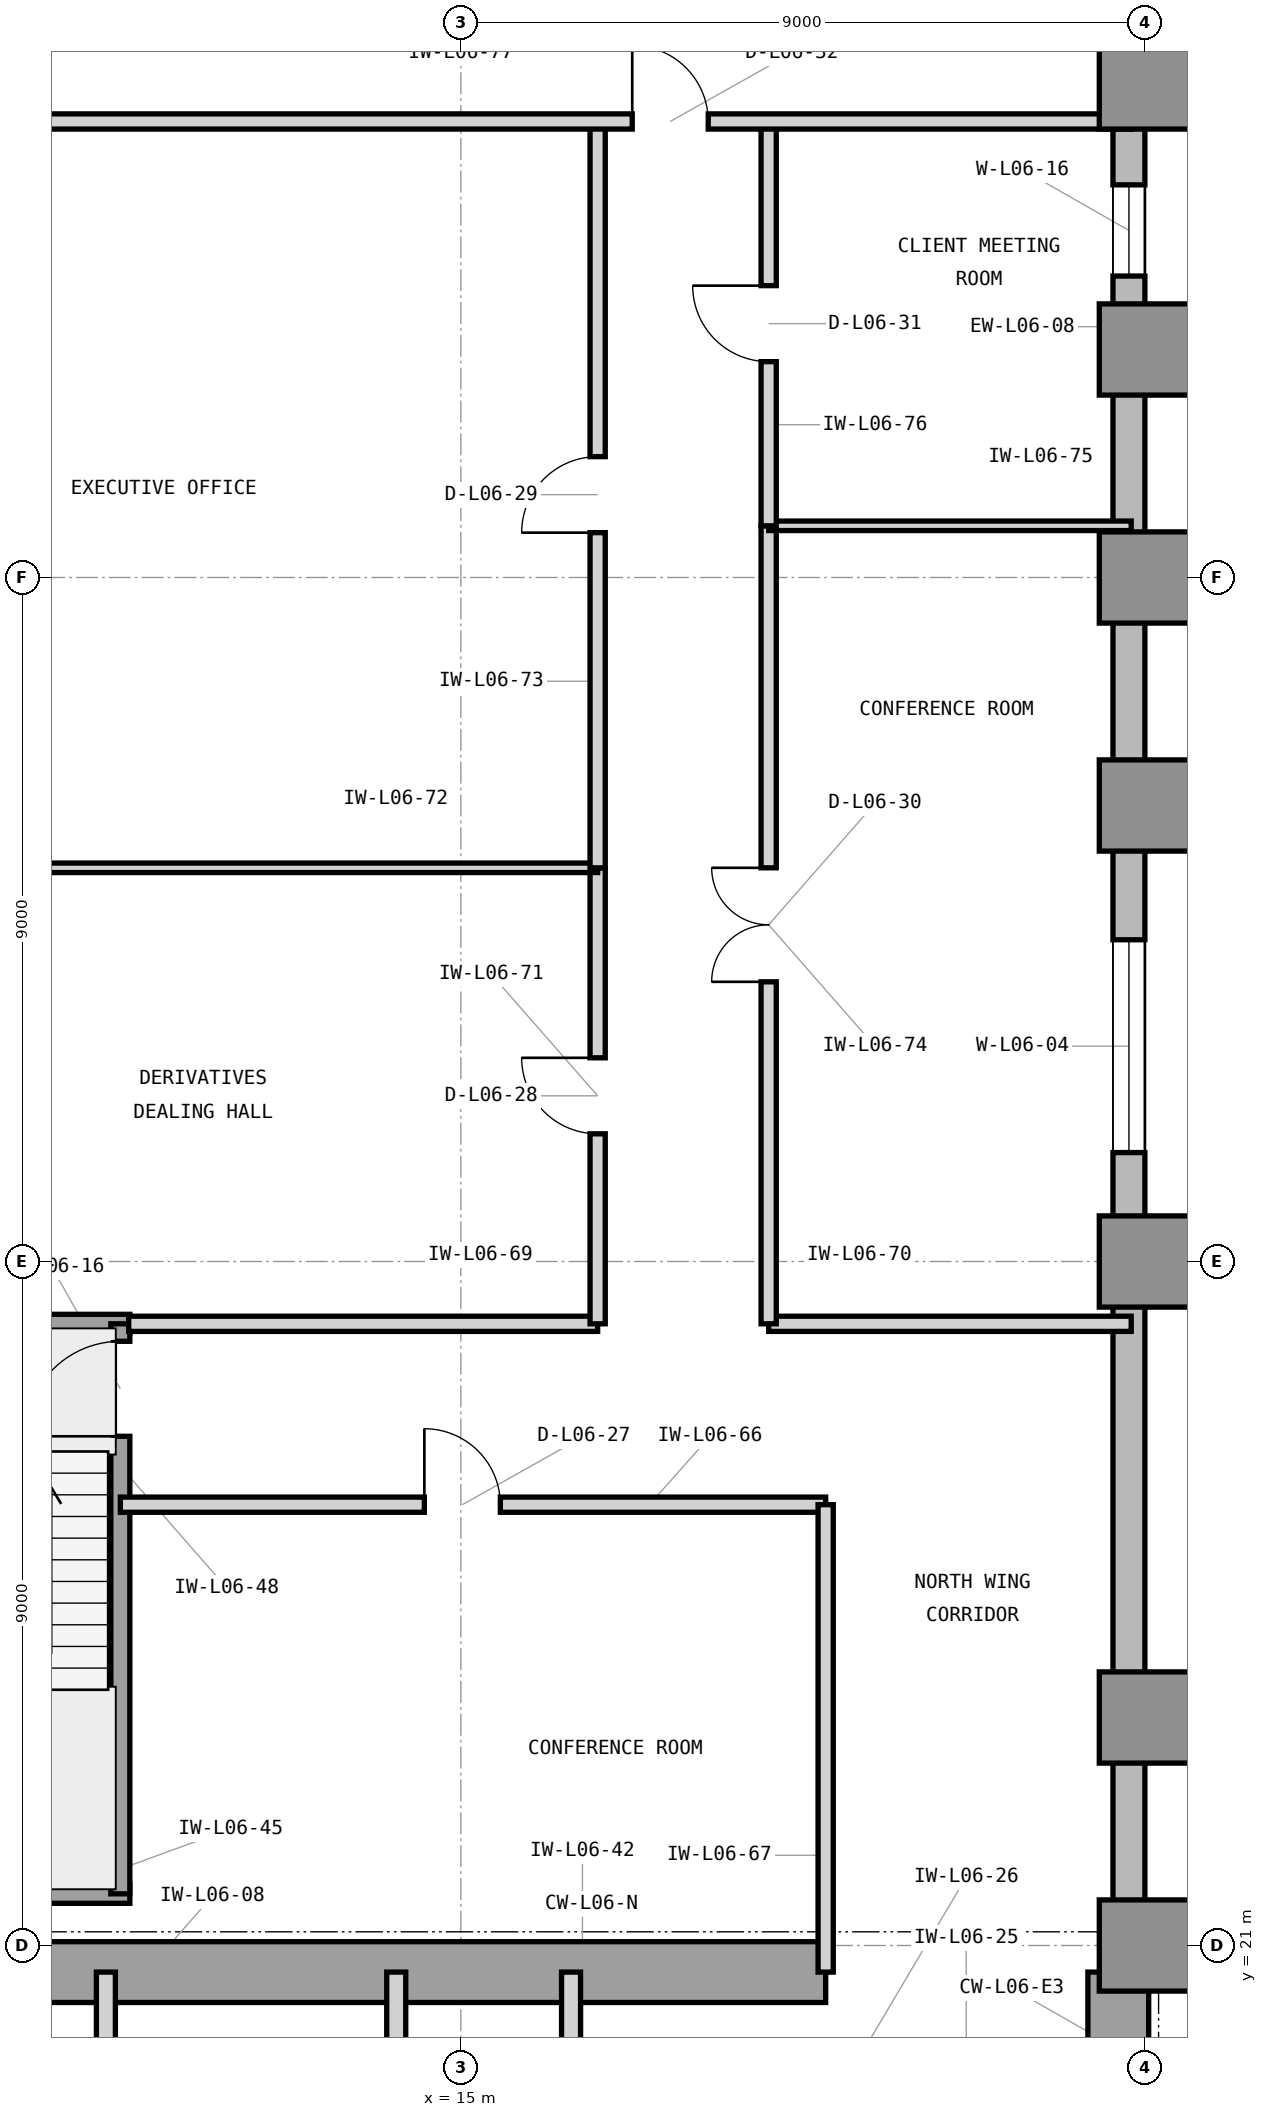
"""IFC4 building model, lengths in metres.
Left out: names, types, materials, properties, quantities, classifications, styles, units other than length and angle.
Written with IfcOpenShell. Run it as: python <this file> out.ifc"""

import sys

from ifc_helpers import new_model, si_unit, direction, frame, frame_2d, origin, origin_2d, place, context, subcontext, project, spatial, rectangle, extrude, element, fill, save


model = new_model("IFC4")
c1 = context("Model", 3, precision=1e-05, world=origin(), true_north=direction((0.0, 1.0)))
c2 = subcontext(c1, "Body", "Model", "MODEL_VIEW")
j1 = project(units=[si_unit("LENGTHUNIT", "METRE"), si_unit("PLANEANGLEUNIT", "RADIAN")], contexts=[c1])
p1 = place(None, origin())
s1 = spatial("IfcSite", under=j1, at=p1, CompositionType="ELEMENT")
p2 = place(p1, origin())
s2 = spatial("IfcBuilding", under=s1, at=p2, CompositionType="ELEMENT")
p3 = place(p2, frame((0.0, 0.0, 30.0)))
s3 = spatial("IfcBuildingStorey", under=s2, at=p3, CompositionType="ELEMENT", Elevation=30.0)
p4 = place(p3, frame((7.475, 20.65, 0.0), z_axis=(0.0, 0.0, 1.0), x_axis=(1.0, 0.0, 0.0)))
e1 = element("IfcWall", 1, at=p4, inside=s3, PredefinedType="SHEAR", context=c2, shape_type="SweptSolid", body=[
    extrude(rectangle(XDim=12.325, YDim=0.8, at=frame_2d((6.163, 0.0))), origin(), (0.0, 0.0, 1.0), 4.2),
])
p5 = place(p3, frame((23.65, 16.6, 0.0), z_axis=(0.0, 0.0, 1.0), x_axis=(0.0, 1.0, 0.0)))
e2 = element("IfcWall", 2, at=p5, inside=s3, PredefinedType="SHEAR", context=c2, shape_type="SweptSolid", body=[
    extrude(rectangle(XDim=4.05, YDim=0.8, at=frame_2d((2.025, 0.0))), origin(), (0.0, 0.0, 1.0), 4.2),
])
for number, where, z_axis, x_axis in (
    (3, (24.0, 21.0, 0.0), (0.0, 0.0, 1.0), (1.0, 0.0, 0.0)),
    (4, (24.0, 24.0, 0.0), (0.0, 0.0, 1.0), (1.0, 0.0, 0.0)),
    (5, (24.0, 30.0, 0.0), (0.0, 0.0, 1.0), (1.0, 0.0, 0.0)),
    (6, (24.0, 36.0, 0.0), (0.0, 0.0, 1.0), (1.0, 0.0, 0.0)),
    (7, (24.0, 39.0, 0.0), (0.0, 0.0, 1.0), (1.0, 0.0, 0.0)),
    (8, (24.0, 42.0, 0.0), (0.0, 0.0, 1.0), (1.0, 0.0, 0.0)),
    (9, (24.0, 45.5, 0.0), (0.0, 0.0, 1.0), (1.0, 0.0, 0.0)),
):
    element("IfcColumn", number, at=place(p3, frame(where, z_axis=z_axis, x_axis=x_axis)), inside=s3, PredefinedType="COLUMN", context=c2, shape_type="SweptSolid", body=[
        extrude(rectangle(XDim=1.2, YDim=1.2, at=origin_2d()), origin(), (0.0, 0.0, 1.0), 4.2),
    ])
p6 = place(p3, frame((64.4, 20.79, 0.0), z_axis=(0.0, 0.0, 1.0), x_axis=(-1.0, 0.0, 0.0)))
e10 = element("IfcWall", 10, at=p6, inside=s3, PredefinedType="STANDARD", context=c2, shape_type="SweptSolid", body=[
    extrude(rectangle(XDim=40.4, YDim=0.42, at=frame_2d((20.2, 0.0))), origin(), (0.0, 0.0, 1.0), 3.98),
])
p7 = place(p6, frame((26.375, 0.0, 0.85)))
e11 = element("IfcOpeningElement", 11, at=p7, cuts=e10, PredefinedType="OPENING", context=c2, shape_type="SweptSolid", body=[
    extrude(rectangle(XDim=2.8, YDim=2.45, at=frame_2d((1.4, 1.225))), frame((0.0, 0.22, 0.0), z_axis=(0.0, -1.0, 0.0), x_axis=(1.0, 0.0, 0.0)), (0.0, 0.0, 1.0), 0.44),
])
p8 = place(p6, frame((38.222, 0.0, 0.85)))
e12 = element("IfcOpeningElement", 12, at=p8, cuts=e10, PredefinedType="OPENING", context=c2, shape_type="SweptSolid", body=[
    extrude(rectangle(XDim=1.2, YDim=2.45, at=frame_2d((0.6, 1.225))), frame((0.0, 0.22, 0.0), z_axis=(0.0, -1.0, 0.0), x_axis=(1.0, 0.0, 0.0)), (0.0, 0.0, 1.0), 0.44),
])
p9 = place(p6, frame((32.536, 0.0, 0.85)))
e13 = element("IfcOpeningElement", 13, at=p9, cuts=e10, PredefinedType="OPENING", context=c2, shape_type="SweptSolid", body=[
    extrude(rectangle(XDim=2.8, YDim=2.45, at=frame_2d((1.4, 1.225))), frame((0.0, 0.22, 0.0), z_axis=(0.0, -1.0, 0.0), x_axis=(1.0, 0.0, 0.0)), (0.0, 0.0, 1.0), 0.44),
])
p10 = place(p6, frame((17.386, 0.0, 0.85)))
e14 = element("IfcOpeningElement", 14, at=p10, cuts=e10, PredefinedType="OPENING", context=c2, shape_type="SweptSolid", body=[
    extrude(rectangle(XDim=2.8, YDim=2.45, at=frame_2d((1.4, 1.225))), frame((0.0, 0.22, 0.0), z_axis=(0.0, -1.0, 0.0), x_axis=(1.0, 0.0, 0.0)), (0.0, 0.0, 1.0), 0.44),
])
p11 = place(p6, frame((8.436, 0.0, 0.85)))
e15 = element("IfcOpeningElement", 15, at=p11, cuts=e10, PredefinedType="OPENING", context=c2, shape_type="SweptSolid", body=[
    extrude(rectangle(XDim=1.2, YDim=2.45, at=frame_2d((0.6, 1.225))), frame((0.0, 0.22, 0.0), z_axis=(0.0, -1.0, 0.0), x_axis=(1.0, 0.0, 0.0)), (0.0, 0.0, 1.0), 0.44),
])
p12 = place(p3, frame((23.79, 21.0, 0.0), z_axis=(0.0, 0.0, 1.0), x_axis=(0.0, 1.0, 0.0)))
e16 = element("IfcWall", 16, at=p12, inside=s3, PredefinedType="STANDARD", context=c2, shape_type="SweptSolid", body=[
    extrude(rectangle(XDim=28.4, YDim=0.42, at=frame_2d((14.2, 0.0))), origin(), (0.0, 0.0, 1.0), 3.98),
])
p13 = place(p12, frame((10.433, 0.0, 0.85)))
e17 = element("IfcOpeningElement", 17, at=p13, cuts=e16, PredefinedType="OPENING", context=c2, shape_type="SweptSolid", body=[
    extrude(rectangle(XDim=2.8, YDim=2.45, at=frame_2d((1.4, 1.225))), frame((0.0, 0.22, 0.0), z_axis=(0.0, -1.0, 0.0), x_axis=(1.0, 0.0, 0.0)), (0.0, 0.0, 1.0), 0.44),
])
p14 = place(p12, frame((21.966, 0.0, 0.85)))
e18 = element("IfcOpeningElement", 18, at=p14, cuts=e16, PredefinedType="OPENING", context=c2, shape_type="SweptSolid", body=[
    extrude(rectangle(XDim=1.2, YDim=2.45, at=frame_2d((0.6, 1.225))), frame((0.0, 0.22, 0.0), z_axis=(0.0, -1.0, 0.0), x_axis=(1.0, 0.0, 0.0)), (0.0, 0.0, 1.0), 0.44),
])
p15 = place(p3, frame((10.33, 19.45, 0.0), z_axis=(0.0, 0.0, 1.0), x_axis=(0.0, 1.0, 0.0)))
e19 = element("IfcWall", 19, at=p15, inside=s3, PredefinedType="PARTITIONING", context=c2, shape_type="SweptSolid", body=[
    extrude(rectangle(XDim=1.2, YDim=0.25, at=frame_2d((0.6, 0.0))), origin(), (0.0, 0.0, 1.0), 3.114),
])
for number, where, z_axis, x_axis in (
    (20, (14.15, 16.7, 0.0), (0.0, 0.0, 1.0), (0.0, 1.0, 0.0)),
    (21, (16.45, 16.7, 0.0), (0.0, 0.0, 1.0), (0.0, 1.0, 0.0)),
):
    element("IfcWall", number, at=place(p3, frame(where, z_axis=z_axis, x_axis=x_axis)), inside=s3, PredefinedType="PARTITIONING", context=c2, shape_type="SweptSolid", body=[
        extrude(rectangle(XDim=3.95, YDim=0.25, at=frame_2d((1.975, 0.0))), origin(), (0.0, 0.0, 1.0), 3.97),
    ])
for number, where, z_axis, x_axis in (
    (22, (6.555, 21.68, 0.0), (0.0, 0.0, 1.0), (1.0, 0.0, 0.0)),
    (23, (6.555, 29.18, 0.0), (0.0, 0.0, 1.0), (1.0, 0.0, 0.0)),
):
    element("IfcWall", number, at=place(p3, frame(where, z_axis=z_axis, x_axis=x_axis)), inside=s3, PredefinedType="SHEAR", context=c2, shape_type="SweptSolid", body=[
        extrude(rectangle(XDim=4.09, YDim=0.25, at=frame_2d((2.045, 0.0))), origin(), (0.0, 0.0, 1.0), 4.2),
    ])
p16 = place(p3, frame((10.52, 21.68, 0.0), z_axis=(0.0, 0.0, 1.0), x_axis=(0.0, 1.0, 0.0)))
e24 = element("IfcWall", 24, at=p16, inside=s3, PredefinedType="SHEAR", context=c2, shape_type="SweptSolid", body=[
    extrude(rectangle(XDim=7.5, YDim=0.25, at=frame_2d((3.75, 0.0))), origin(), (0.0, 0.0, 1.0), 4.2),
])
p17 = place(p16, frame((6.02, 0.0, 0.0)))
e25 = element("IfcOpeningElement", 25, at=p17, cuts=e24, PredefinedType="OPENING", context=c2, shape_type="SweptSolid", body=[
    extrude(rectangle(XDim=1.25, YDim=2.2, at=frame_2d((0.625, 1.1))), frame((0.0, 0.135, 0.0), z_axis=(0.0, -1.0, 0.0), x_axis=(1.0, 0.0, 0.0)), (0.0, 0.0, 1.0), 0.27),
])
p18 = place(p3, frame((10.52, 26.8, 0.0), z_axis=(0.0, 0.0, 1.0), x_axis=(1.0, 0.0, 0.0)))
e26 = element("IfcWall", 26, at=p18, inside=s3, PredefinedType="PARTITIONING", context=c2, shape_type="SweptSolid", body=[
    extrude(rectangle(XDim=9.28, YDim=0.2, at=frame_2d((4.64, 0.0))), origin(), (0.0, 0.0, 1.0), 3.97),
])
p19 = place(p18, frame((4.0, 0.0, 0.0)))
e27 = element("IfcOpeningElement", 27, at=p19, cuts=e26, PredefinedType="OPENING", context=c2, shape_type="SweptSolid", body=[
    extrude(rectangle(XDim=1.0, YDim=2.15, at=frame_2d((0.5, 1.075))), frame((0.0, 0.11, 0.0), z_axis=(0.0, -1.0, 0.0), x_axis=(1.0, 0.0, 0.0)), (0.0, 0.0, 1.0), 0.22),
])
p20 = place(p3, frame((19.8, 20.65, 0.0), z_axis=(0.0, 0.0, 1.0), x_axis=(0.0, 1.0, 0.0)))
e28 = element("IfcWall", 28, at=p20, inside=s3, PredefinedType="PARTITIONING", context=c2, shape_type="SweptSolid", body=[
    extrude(rectangle(XDim=6.15, YDim=0.2, at=frame_2d((3.075, 0.0))), origin(), (0.0, 0.0, 1.0), 3.97),
])
p21 = place(p3, frame((10.63, 29.18, 0.0), z_axis=(0.0, 0.0, 1.0), x_axis=(1.0, 0.0, 0.0)))
e29 = element("IfcWall", 29, at=p21, inside=s3, PredefinedType="PARTITIONING", context=c2, shape_type="SweptSolid", body=[
    extrude(rectangle(XDim=6.17, YDim=0.2, at=frame_2d((3.085, 0.0))), origin(), (0.0, 0.0, 1.0), 3.97),
])
p22 = place(p3, frame((19.05, 29.18, 0.0), z_axis=(0.0, 0.0, 1.0), x_axis=(1.0, 0.0, 0.0)))
e30 = element("IfcWall", 30, at=p22, inside=s3, PredefinedType="PARTITIONING", context=c2, shape_type="SweptSolid", body=[
    extrude(rectangle(XDim=4.77, YDim=0.2, at=frame_2d((2.385, 0.0))), origin(), (0.0, 0.0, 1.0), 3.97),
])
p23 = place(p3, frame((16.8, 29.18, 0.0), z_axis=(0.0, 0.0, 1.0), x_axis=(0.0, 1.0, 0.0)))
e31 = element("IfcWall", 31, at=p23, inside=s3, PredefinedType="PARTITIONING", context=c2, shape_type="SweptSolid", body=[
    extrude(rectangle(XDim=6.0, YDim=0.2, at=frame_2d((3.0, 0.0))), origin(), (0.0, 0.0, 1.0), 3.97),
])
p24 = place(p23, frame((2.5, 0.0, 0.0)))
e32 = element("IfcOpeningElement", 32, at=p24, cuts=e31, PredefinedType="OPENING", context=c2, shape_type="SweptSolid", body=[
    extrude(rectangle(XDim=1.0, YDim=2.15, at=frame_2d((0.5, 1.075))), frame((0.0, 0.11, 0.0), z_axis=(0.0, -1.0, 0.0), x_axis=(1.0, 0.0, 0.0)), (0.0, 0.0, 1.0), 0.22),
])
p25 = place(p3, frame((6.18, 35.18, 0.0), z_axis=(0.0, 0.0, 1.0), x_axis=(1.0, 0.0, 0.0)))
e33 = element("IfcWall", 33, at=p25, inside=s3, PredefinedType="PARTITIONING", context=c2, shape_type="SweptSolid", body=[
    extrude(rectangle(XDim=10.62, YDim=0.125, at=frame_2d((5.31, 0.0))), origin(), (0.0, 0.0, 1.0), 3.97),
])
p26 = place(p3, frame((16.8, 35.18, 0.0), z_axis=(0.0, 0.0, 1.0), x_axis=(0.0, 1.0, 0.0)))
e34 = element("IfcWall", 34, at=p26, inside=s3, PredefinedType="PARTITIONING", context=c2, shape_type="SweptSolid", body=[
    extrude(rectangle(XDim=9.82, YDim=0.2, at=frame_2d((4.91, 0.0))), origin(), (0.0, 0.0, 1.0), 3.97),
])
p27 = place(p26, frame((4.41, 0.0, 0.0)))
e35 = element("IfcOpeningElement", 35, at=p27, cuts=e34, PredefinedType="OPENING", context=c2, shape_type="SweptSolid", body=[
    extrude(rectangle(XDim=1.0, YDim=2.15, at=frame_2d((0.5, 1.075))), frame((0.0, 0.11, 0.0), z_axis=(0.0, -1.0, 0.0), x_axis=(1.0, 0.0, 0.0)), (0.0, 0.0, 1.0), 0.22),
])
p28 = place(p3, frame((19.05, 29.18, 0.0), z_axis=(0.0, 0.0, 1.0), x_axis=(0.0, 1.0, 0.0)))
e36 = element("IfcWall", 36, at=p28, inside=s3, PredefinedType="PARTITIONING", context=c2, shape_type="SweptSolid", body=[
    extrude(rectangle(XDim=10.5, YDim=0.2, at=frame_2d((5.25, 0.0))), origin(), (0.0, 0.0, 1.0), 3.97),
])
p29 = place(p28, frame((4.5, 0.0, 0.0)))
e37 = element("IfcOpeningElement", 37, at=p29, cuts=e36, PredefinedType="OPENING", context=c2, shape_type="SweptSolid", body=[
    extrude(rectangle(XDim=1.5, YDim=2.3, at=frame_2d((0.75, 1.15))), frame((0.0, 0.11, 0.0), z_axis=(0.0, -1.0, 0.0), x_axis=(1.0, 0.0, 0.0)), (0.0, 0.0, 1.0), 0.22),
])
p30 = place(p3, frame((19.05, 39.68, 0.0), z_axis=(0.0, 0.0, 1.0), x_axis=(1.0, 0.0, 0.0)))
e38 = element("IfcWall", 38, at=p30, inside=s3, PredefinedType="PARTITIONING", context=c2, shape_type="SweptSolid", body=[
    extrude(rectangle(XDim=4.77, YDim=0.125, at=frame_2d((2.385, 0.0))), origin(), (0.0, 0.0, 1.0), 3.97),
])
p31 = place(p3, frame((19.05, 39.68, 0.0), z_axis=(0.0, 0.0, 1.0), x_axis=(0.0, 1.0, 0.0)))
e39 = element("IfcWall", 39, at=p31, inside=s3, PredefinedType="PARTITIONING", context=c2, shape_type="SweptSolid", body=[
    extrude(rectangle(XDim=5.32, YDim=0.2, at=frame_2d((2.66, 0.0))), origin(), (0.0, 0.0, 1.0), 3.97),
])
p32 = place(p31, frame((2.16, 0.0, 0.0)))
e40 = element("IfcOpeningElement", 40, at=p32, cuts=e39, PredefinedType="OPENING", context=c2, shape_type="SweptSolid", body=[
    extrude(rectangle(XDim=1.0, YDim=2.15, at=frame_2d((0.5, 1.075))), frame((0.0, 0.11, 0.0), z_axis=(0.0, -1.0, 0.0), x_axis=(1.0, 0.0, 0.0)), (0.0, 0.0, 1.0), 0.22),
])
p33 = place(p3, frame((6.18, 45.0, 0.0), z_axis=(0.0, 0.0, 1.0), x_axis=(1.0, 0.0, 0.0)))
e41 = element("IfcWall", 41, at=p33, inside=s3, PredefinedType="PARTITIONING", context=c2, shape_type="SweptSolid", body=[
    extrude(rectangle(XDim=17.64, YDim=0.2, at=frame_2d((8.82, 0.0))), origin(), (0.0, 0.0, 1.0), 3.97),
])
p34 = place(p33, frame((11.075, 0.0, 0.0)))
e42 = element("IfcOpeningElement", 42, at=p34, cuts=e41, PredefinedType="OPENING", context=c2, shape_type="SweptSolid", body=[
    extrude(rectangle(XDim=1.0, YDim=2.15, at=frame_2d((0.5, 1.075))), frame((0.0, 0.11, 0.0), z_axis=(0.0, -1.0, 0.0), x_axis=(1.0, 0.0, 0.0)), (0.0, 0.0, 1.0), 0.22),
])
p35 = place(p13, origin())
e43 = element("IfcWindow", 43, at=p35, inside=s3, PartitioningType="SINGLE_PANEL", PredefinedType="WINDOW", context=c2, shape_type="SweptSolid", body=[
    extrude(rectangle(XDim=2.8, YDim=2.45, at=frame_2d((1.4, 1.225))), frame((0.0, 0.11, 0.0), z_axis=(0.0, -1.0, 0.0), x_axis=(1.0, 0.0, 0.0)), (0.0, 0.0, 1.0), 0.06),
])
fill(e17, e43)
p36 = place(p17, origin())
e44 = element("IfcDoor", 44, at=p36, inside=s3, OperationType="SINGLE_SWING_LEFT", PredefinedType="DOOR", context=c2, shape_type="SweptSolid", body=[
    extrude(rectangle(XDim=1.25, YDim=2.2, at=frame_2d((0.625, 1.1))), frame((0.0, 0.025, 0.0), z_axis=(0.0, -1.0, 0.0), x_axis=(1.0, 0.0, 0.0)), (0.0, 0.0, 1.0), 0.05),
])
fill(e25, e44)
p37 = place(p19, origin())
e45 = element("IfcDoor", 45, at=p37, inside=s3, OperationType="SINGLE_SWING_LEFT", PredefinedType="DOOR", context=c2, shape_type="SweptSolid", body=[
    extrude(rectangle(XDim=1.0, YDim=2.15, at=frame_2d((0.5, 1.075))), frame((0.0, 0.025, 0.0), z_axis=(0.0, -1.0, 0.0), x_axis=(1.0, 0.0, 0.0)), (0.0, 0.0, 1.0), 0.05),
])
fill(e27, e45)
p38 = place(p24, origin())
e46 = element("IfcDoor", 46, at=p38, inside=s3, OperationType="SINGLE_SWING_RIGHT", PredefinedType="DOOR", context=c2, shape_type="SweptSolid", body=[
    extrude(rectangle(XDim=1.0, YDim=2.15, at=frame_2d((0.5, 1.075))), frame((0.0, 0.025, 0.0), z_axis=(0.0, -1.0, 0.0), x_axis=(1.0, 0.0, 0.0)), (0.0, 0.0, 1.0), 0.05),
])
fill(e32, e46)
p39 = place(p27, origin())
e47 = element("IfcDoor", 47, at=p39, inside=s3, OperationType="SINGLE_SWING_LEFT", PredefinedType="DOOR", context=c2, shape_type="SweptSolid", body=[
    extrude(rectangle(XDim=1.0, YDim=2.15, at=frame_2d((0.5, 1.075))), frame((0.0, 0.025, 0.0), z_axis=(0.0, -1.0, 0.0), x_axis=(1.0, 0.0, 0.0)), (0.0, 0.0, 1.0), 0.05),
])
fill(e35, e47)
p40 = place(p29, origin())
e48 = element("IfcDoor", 48, at=p40, inside=s3, OperationType="DOUBLE_DOOR_SINGLE_SWING", PredefinedType="DOOR", context=c2, shape_type="SweptSolid", body=[
    extrude(rectangle(XDim=1.5, YDim=2.3, at=frame_2d((0.75, 1.15))), frame((0.0, 0.025, 0.0), z_axis=(0.0, -1.0, 0.0), x_axis=(1.0, 0.0, 0.0)), (0.0, 0.0, 1.0), 0.05),
])
fill(e37, e48)
p41 = place(p32, origin())
e49 = element("IfcDoor", 49, at=p41, inside=s3, OperationType="SINGLE_SWING_RIGHT", PredefinedType="DOOR", context=c2, shape_type="SweptSolid", body=[
    extrude(rectangle(XDim=1.0, YDim=2.15, at=frame_2d((0.5, 1.075))), frame((0.0, 0.025, 0.0), z_axis=(0.0, -1.0, 0.0), x_axis=(1.0, 0.0, 0.0)), (0.0, 0.0, 1.0), 0.05),
])
fill(e40, e49)
p42 = place(p34, origin())
e50 = element("IfcDoor", 50, at=p42, inside=s3, OperationType="SINGLE_SWING_LEFT", PredefinedType="DOOR", context=c2, shape_type="SweptSolid", body=[
    extrude(rectangle(XDim=1.0, YDim=2.15, at=frame_2d((0.5, 1.075))), frame((0.0, 0.025, 0.0), z_axis=(0.0, -1.0, 0.0), x_axis=(1.0, 0.0, 0.0)), (0.0, 0.0, 1.0), 0.05),
])
fill(e42, e50)
p43 = place(p14, origin())
e51 = element("IfcWindow", 51, at=p43, inside=s3, PartitioningType="SINGLE_PANEL", PredefinedType="WINDOW", context=c2, shape_type="SweptSolid", body=[
    extrude(rectangle(XDim=1.2, YDim=2.45, at=frame_2d((0.6, 1.225))), frame((0.0, 0.11, 0.0), z_axis=(0.0, -1.0, 0.0), x_axis=(1.0, 0.0, 0.0)), (0.0, 0.0, 1.0), 0.06),
])
fill(e18, e51)
save(model, sys.argv[1])
